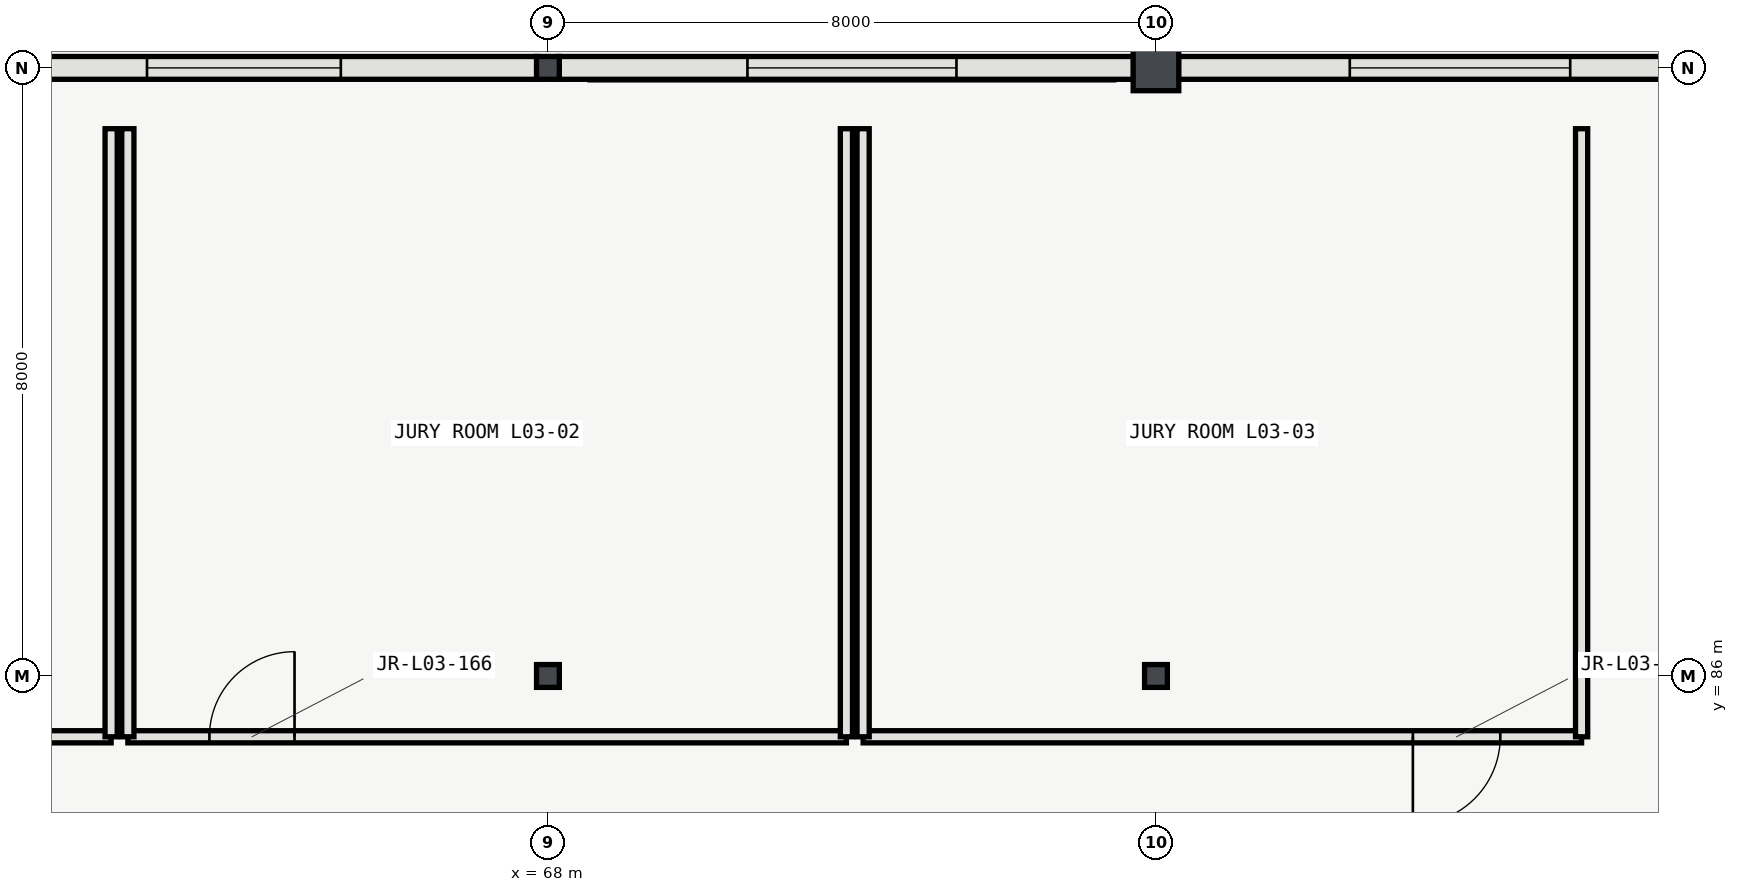
"""IFC4 building model, lengths in metres.
Left out: names, types, materials, properties, quantities, classifications, styles, units other than length and angle.
Written with IfcOpenShell. Run it as: python <this file> out.ifc"""

import sys

from ifc_helpers import new_model, si_unit, direction, frame, frame_2d, origin, origin_2d, place, context, subcontext, project, spatial, rectangle, i_section, extrude, element, fill, save


model = new_model("IFC4")
c1 = context("Model", 3, precision=1e-05, world=origin(), true_north=direction((0.0, 1.0)))
c2 = subcontext(c1, "Body", "Model", "MODEL_VIEW")
j1 = project(units=[si_unit("LENGTHUNIT", "METRE"), si_unit("PLANEANGLEUNIT", "RADIAN")], contexts=[c1])
p1 = place(None, origin())
s1 = spatial("IfcSite", under=j1, at=p1, CompositionType="ELEMENT")
p2 = place(p1, origin())
s2 = spatial("IfcBuilding", under=s1, at=p2, CompositionType="ELEMENT")
p3 = place(p2, frame((0.0, 0.0, 16.2)))
s3 = spatial("IfcBuildingStorey", under=s2, at=p3, CompositionType="ELEMENT", Elevation=16.2)
for number, where, z_axis, x_axis in (
    (1, (68.0, 86.0, 0.0), (0.0, 0.0, 1.0), (1.0, 0.0, 0.0)),
    (2, (68.0, 94.0, 0.0), (0.0, 0.0, 1.0), (1.0, 0.0, 0.0)),
    (3, (76.0, 86.0, 0.0), (0.0, 0.0, 1.0), (1.0, 0.0, 0.0)),
):
    element("IfcColumn", number, at=place(p3, frame(where, z_axis=z_axis, x_axis=x_axis)), inside=s3, PredefinedType="COLUMN", context=c2, shape_type="SweptSolid", body=[
        extrude(i_section(OverallWidth=0.3, OverallDepth=0.3, WebThickness=0.01, FlangeThickness=0.015, FilletRadius=0.018, at=origin_2d()), origin(), (0.0, 0.0, 1.0), 4.2),
    ])
p4 = place(p3, frame((76.0, 94.0, 0.0), z_axis=(0.0, 0.0, 1.0), x_axis=(1.0, 0.0, 0.0)))
e4 = element("IfcColumn", 4, at=p4, inside=s3, PredefinedType="COLUMN", context=c2, shape_type="SweptSolid", body=[
    extrude(rectangle(XDim=0.6, YDim=0.6, at=origin_2d()), origin(), (0.0, 0.0, 1.0), 4.2),
])
p5 = place(p3, frame((67.854, 94.0, 0.0), z_axis=(0.0, 0.0, 1.0), x_axis=(-1.0, 0.0, 0.0)))
e5 = element("IfcWall", 5, at=p5, inside=s3, PredefinedType="SOLIDWALL", context=c2, shape_type="SweptSolid", body=[
    extrude(rectangle(XDim=7.708, YDim=0.3, at=frame_2d((3.854, 0.0))), origin(), (0.0, 0.0, 1.0), 3.423),
])
p6 = place(p5, frame((2.579, 0.0, 0.95)))
e6 = element("IfcOpeningElement", 6, at=p6, cuts=e5, PredefinedType="OPENING", context=c2, shape_type="SweptSolid", body=[
    extrude(rectangle(XDim=2.55, YDim=1.95, at=frame_2d((1.275, 0.975))), frame((0.0, 0.16, 0.0), z_axis=(0.0, -1.0, 0.0), x_axis=(1.0, 0.0, 0.0)), (0.0, 0.0, 1.0), 0.32),
])
p7 = place(p3, frame((75.704, 94.0, 0.0), z_axis=(0.0, 0.0, 1.0), x_axis=(-1.0, 0.0, 0.0)))
e7 = element("IfcWall", 7, at=p7, inside=s3, PredefinedType="SOLIDWALL", context=c2, shape_type="SweptSolid", body=[
    extrude(rectangle(XDim=7.558, YDim=0.3, at=frame_2d((3.779, 0.0))), origin(), (0.0, 0.0, 1.0), 3.423),
])
p8 = place(p7, frame((2.329, 0.0, 0.95)))
e8 = element("IfcOpeningElement", 8, at=p8, cuts=e7, PredefinedType="OPENING", context=c2, shape_type="SweptSolid", body=[
    extrude(rectangle(XDim=2.75, YDim=1.95, at=frame_2d((1.375, 0.975))), frame((0.0, 0.16, 0.0), z_axis=(0.0, -1.0, 0.0), x_axis=(1.0, 0.0, 0.0)), (0.0, 0.0, 1.0), 0.32),
])
p9 = place(p3, frame((83.704, 94.0, 0.0), z_axis=(0.0, 0.0, 1.0), x_axis=(-1.0, 0.0, 0.0)))
e9 = element("IfcWall", 9, at=p9, inside=s3, PredefinedType="SOLIDWALL", context=c2, shape_type="SweptSolid", body=[
    extrude(rectangle(XDim=7.408, YDim=0.3, at=frame_2d((3.704, 0.0))), origin(), (0.0, 0.0, 1.0), 3.423),
])
p10 = place(p9, frame((2.254, 0.0, 0.95)))
e10 = element("IfcOpeningElement", 10, at=p10, cuts=e9, PredefinedType="OPENING", context=c2, shape_type="SweptSolid", body=[
    extrude(rectangle(XDim=2.9, YDim=1.95, at=frame_2d((1.45, 0.975))), frame((0.0, 0.16, 0.0), z_axis=(0.0, -1.0, 0.0), x_axis=(1.0, 0.0, 0.0)), (0.0, 0.0, 1.0), 0.32),
])
p11 = place(p3, frame((52.8, 85.2, 0.0), z_axis=(0.0, 0.0, 1.0), x_axis=(1.0, 0.0, 0.0)))
e11 = element("IfcWall", 11, at=p11, inside=s3, PredefinedType="PARTITIONING", context=c2, shape_type="SweptSolid", body=[
    extrude(rectangle(XDim=9.453, YDim=0.16, at=frame_2d((4.727, 0.0))), origin(), (0.0, 0.0, 1.0), 3.92),
])
p12 = place(p11, frame((2.611, 0.0, 0.0)))
e12 = element("IfcOpeningElement", 12, at=p12, cuts=e11, PredefinedType="OPENING", context=c2, shape_type="SweptSolid", body=[
    extrude(rectangle(XDim=1.15, YDim=2.2, at=frame_2d((0.575, 1.1))), frame((0.0, 0.09, 0.0), z_axis=(0.0, -1.0, 0.0), x_axis=(1.0, 0.0, 0.0)), (0.0, 0.0, 1.0), 0.18),
])
p13 = place(p3, frame((62.253, 85.2, 0.0), z_axis=(0.0, 0.0, 1.0), x_axis=(0.0, 1.0, 0.0)))
e13 = element("IfcWall", 13, at=p13, inside=s3, PredefinedType="PARTITIONING", context=c2, shape_type="SweptSolid", body=[
    extrude(rectangle(XDim=8.0, YDim=0.16, at=frame_2d((4.0, 0.0))), origin(), (0.0, 0.0, 1.0), 3.92),
])
p14 = place(p3, frame((62.473, 85.2, 0.0), z_axis=(0.0, 0.0, 1.0), x_axis=(1.0, 0.0, 0.0)))
e14 = element("IfcWall", 14, at=p14, inside=s3, PredefinedType="PARTITIONING", context=c2, shape_type="SweptSolid", body=[
    extrude(rectangle(XDim=9.454, YDim=0.16, at=frame_2d((4.727, 0.0))), origin(), (0.0, 0.0, 1.0), 3.92),
])
p15 = place(p14, frame((1.073, 0.0, 0.0)))
e15 = element("IfcOpeningElement", 15, at=p15, cuts=e14, PredefinedType="OPENING", context=c2, shape_type="SweptSolid", body=[
    extrude(rectangle(XDim=1.12, YDim=2.2, at=frame_2d((0.56, 1.1))), frame((0.0, 0.09, 0.0), z_axis=(0.0, -1.0, 0.0), x_axis=(1.0, 0.0, 0.0)), (0.0, 0.0, 1.0), 0.18),
])
p16 = place(p3, frame((62.473, 93.2, 0.0), z_axis=(0.0, 0.0, 1.0), x_axis=(0.0, -1.0, 0.0)))
e16 = element("IfcWall", 16, at=p16, inside=s3, PredefinedType="PARTITIONING", context=c2, shape_type="SweptSolid", body=[
    extrude(rectangle(XDim=8.0, YDim=0.16, at=frame_2d((4.0, 0.0))), origin(), (0.0, 0.0, 1.0), 3.92),
])
p17 = place(p3, frame((71.927, 85.2, 0.0), z_axis=(0.0, 0.0, 1.0), x_axis=(0.0, 1.0, 0.0)))
e17 = element("IfcWall", 17, at=p17, inside=s3, PredefinedType="PARTITIONING", context=c2, shape_type="SweptSolid", body=[
    extrude(rectangle(XDim=8.0, YDim=0.16, at=frame_2d((4.0, 0.0))), origin(), (0.0, 0.0, 1.0), 3.432),
])
p18 = place(p3, frame((72.147, 85.2, 0.0), z_axis=(0.0, 0.0, 1.0), x_axis=(1.0, 0.0, 0.0)))
e18 = element("IfcWall", 18, at=p18, inside=s3, PredefinedType="PARTITIONING", context=c2, shape_type="SweptSolid", body=[
    extrude(rectangle(XDim=9.453, YDim=0.16, at=frame_2d((4.727, 0.0))), origin(), (0.0, 0.0, 1.0), 3.92),
])
p19 = place(p18, frame((7.233, 0.0, 0.0)))
e19 = element("IfcOpeningElement", 19, at=p19, cuts=e18, PredefinedType="OPENING", context=c2, shape_type="SweptSolid", body=[
    extrude(rectangle(XDim=1.15, YDim=2.2, at=frame_2d((0.575, 1.1))), frame((0.0, 0.09, 0.0), z_axis=(0.0, -1.0, 0.0), x_axis=(1.0, 0.0, 0.0)), (0.0, 0.0, 1.0), 0.18),
])
p20 = place(p3, frame((72.147, 93.2, 0.0), z_axis=(0.0, 0.0, 1.0), x_axis=(0.0, -1.0, 0.0)))
e20 = element("IfcWall", 20, at=p20, inside=s3, PredefinedType="PARTITIONING", context=c2, shape_type="SweptSolid", body=[
    extrude(rectangle(XDim=8.0, YDim=0.16, at=frame_2d((4.0, 0.0))), origin(), (0.0, 0.0, 1.0), 3.432),
])
p21 = place(p3, frame((81.6, 85.2, 0.0), z_axis=(0.0, 0.0, 1.0), x_axis=(0.0, 1.0, 0.0)))
e21 = element("IfcWall", 21, at=p21, inside=s3, PredefinedType="PARTITIONING", context=c2, shape_type="SweptSolid", body=[
    extrude(rectangle(XDim=8.0, YDim=0.16, at=frame_2d((4.0, 0.0))), origin(), (0.0, 0.0, 1.0), 3.92),
])
p22 = place(p6, origin())
e22 = element("IfcWindow", 22, at=p22, inside=s3, PartitioningType="SINGLE_PANEL", PredefinedType="WINDOW", context=c2, shape_type="SweptSolid", body=[
    extrude(rectangle(XDim=2.55, YDim=1.95, at=frame_2d((1.275, 0.975))), frame((0.0, 0.03, 0.0), z_axis=(0.0, -1.0, 0.0), x_axis=(1.0, 0.0, 0.0)), (0.0, 0.0, 1.0), 0.06),
])
fill(e6, e22)
p23 = place(p8, origin())
e23 = element("IfcWindow", 23, at=p23, inside=s3, PartitioningType="SINGLE_PANEL", PredefinedType="WINDOW", context=c2, shape_type="SweptSolid", body=[
    extrude(rectangle(XDim=2.75, YDim=1.95, at=frame_2d((1.375, 0.975))), frame((0.0, 0.03, 0.0), z_axis=(0.0, -1.0, 0.0), x_axis=(1.0, 0.0, 0.0)), (0.0, 0.0, 1.0), 0.06),
])
fill(e8, e23)
p24 = place(p10, origin())
e24 = element("IfcWindow", 24, at=p24, inside=s3, PartitioningType="SINGLE_PANEL", PredefinedType="WINDOW", context=c2, shape_type="SweptSolid", body=[
    extrude(rectangle(XDim=2.9, YDim=1.95, at=frame_2d((1.45, 0.975))), frame((0.0, 0.03, 0.0), z_axis=(0.0, -1.0, 0.0), x_axis=(1.0, 0.0, 0.0)), (0.0, 0.0, 1.0), 0.06),
])
fill(e10, e24)
p25 = place(p15, origin())
e25 = element("IfcDoor", 25, at=p25, inside=s3, OperationType="SINGLE_SWING_RIGHT", PredefinedType="DOOR", context=c2, shape_type="SweptSolid", body=[
    extrude(rectangle(XDim=1.12, YDim=2.2, at=frame_2d((0.56, 1.1))), frame((0.0, 0.025, 0.0), z_axis=(0.0, -1.0, 0.0), x_axis=(1.0, 0.0, 0.0)), (0.0, 0.0, 1.0), 0.05),
])
fill(e15, e25)
p26 = place(p19, origin())
e26 = element("IfcDoor", 26, at=p26, inside=s3, OperationType="SINGLE_SWING_LEFT", PredefinedType="DOOR", context=c2, shape_type="SweptSolid", body=[
    extrude(rectangle(XDim=1.15, YDim=2.2, at=frame_2d((0.575, 1.1))), frame((0.0, 0.025, 0.0), z_axis=(0.0, -1.0, 0.0), x_axis=(1.0, 0.0, 0.0)), (0.0, 0.0, 1.0), 0.05),
])
fill(e19, e26)
save(model, sys.argv[1])
